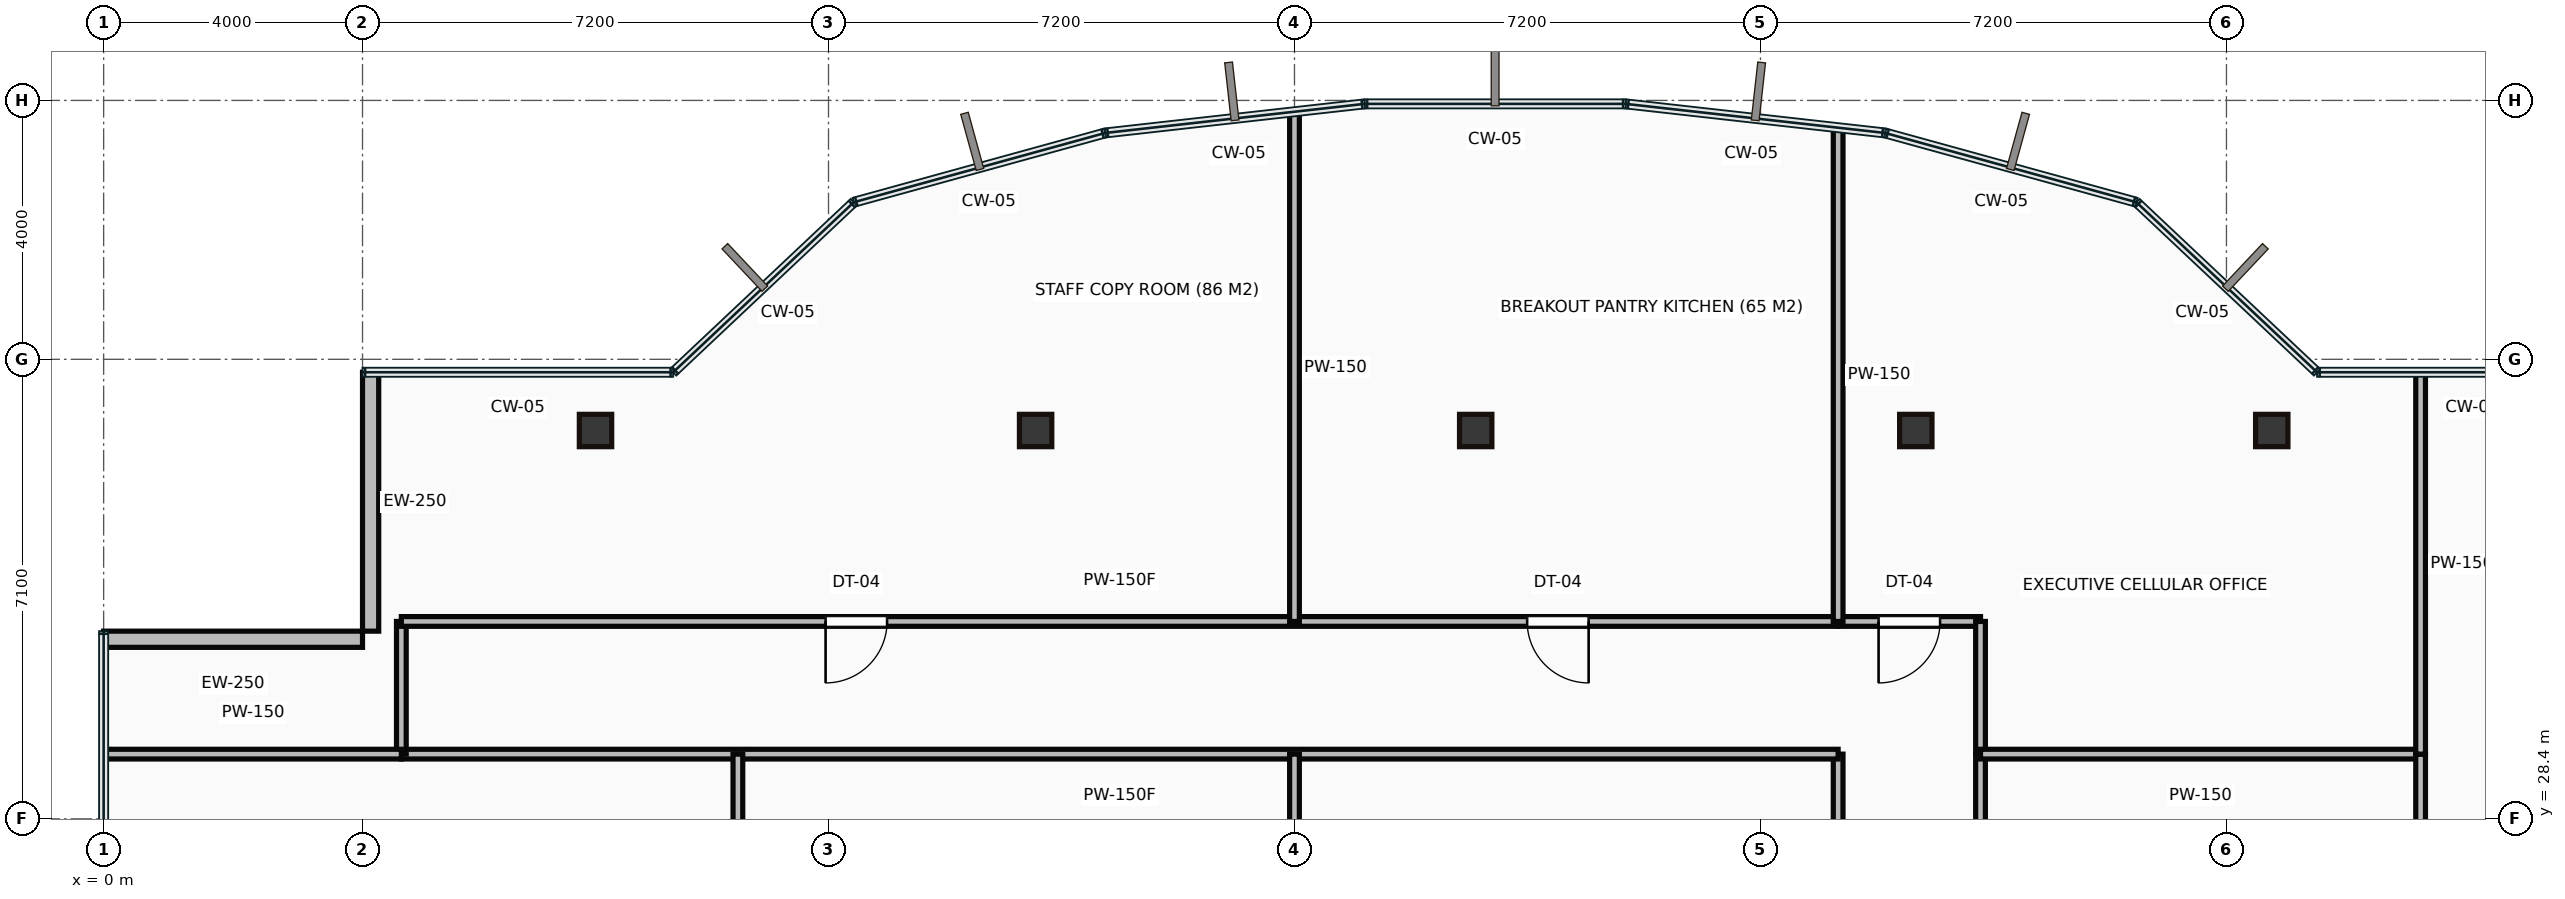
"""IFC4 building model, lengths in metres.
Left out: names, types, materials, properties, quantities, classifications, styles, units other than length and angle.
Written with IfcOpenShell. Run it as: python <this file> out.ifc"""

import sys

from ifc_helpers import new_model, si_unit, direction, frame, frame_2d, origin, origin_2d, place, context, subcontext, project, spatial, rectangle, hollow_rectangle, extrude, source, transform, mapped, element, fill, save


model = new_model("IFC4")
c1 = context("Model", 3, precision=1e-05, world=origin(), true_north=direction((0.0, 1.0)))
c2 = subcontext(c1, "Body", "Model", "MODEL_VIEW")
j1 = project(units=[si_unit("LENGTHUNIT", "METRE"), si_unit("PLANEANGLEUNIT", "RADIAN")], contexts=[c1])
p1 = place(None, origin())
s1 = spatial("IfcSite", under=j1, at=p1, CompositionType="ELEMENT")
p2 = place(p1, origin())
s2 = spatial("IfcBuilding", under=s1, at=p2, CompositionType="ELEMENT")
p3 = place(p2, frame((0.0, 0.0, 225.1)))
s3 = spatial("IfcBuildingStorey", under=s2, at=p3, CompositionType="ELEMENT", Elevation=225.1)
m1 = source(origin(), c2, "Body", "SweptSolid", [
    extrude(hollow_rectangle(XDim=0.5, YDim=0.5, WallThickness=0.022, at=origin_2d()), origin(), (0.0, 0.0, 1.0), 3.65),
])
for number, where, z_axis, x_axis in (
    (1, (7.6, 34.4, 0.0), (0.0, 0.0, 1.0), (1.0, 0.0, 0.0)),
    (2, (14.4, 34.4, 0.0), (0.0, 0.0, 1.0), (1.0, 0.0, 0.0)),
    (3, (21.2, 34.4, 0.0), (0.0, 0.0, 1.0), (1.0, 0.0, 0.0)),
    (4, (28.0, 34.4, 0.0), (0.0, 0.0, 1.0), (1.0, 0.0, 0.0)),
    (5, (33.5, 34.4, 0.0), (0.0, 0.0, 1.0), (1.0, 0.0, 0.0)),
):
    element("IfcColumn", number, at=place(p3, frame(where, z_axis=z_axis, x_axis=x_axis)), inside=s3, PredefinedType="COLUMN", context=c2, shape_type="MappedRepresentation", body=[
        mapped(m1, transform((0.0, 0.0, 0.0))),
    ])
m2 = source(origin(), c2, "Body", "SweptSolid", [
    extrude(rectangle(XDim=4.0, YDim=0.25, at=frame_2d((2.0, 0.0))), origin(), (0.0, 0.0, 1.0), 3.4),
])
for number, where, z_axis, x_axis in (
    (6, (4.125, 35.3, 0.0), (0.0, 0.0, 1.0), (0.0, -1.0, 0.0)),
    (7, (4.0, 31.175, 0.0), (0.0, 0.0, 1.0), (-1.0, 0.0, 0.0)),
):
    element("IfcWall", number, at=place(p3, frame(where, z_axis=z_axis, x_axis=x_axis)), inside=s3, PredefinedType="STANDARD", context=c2, shape_type="MappedRepresentation", body=[
        mapped(m2, transform((0.0, 0.0, 0.0))),
    ])
m3 = source(origin(), c2, "Body", "SweptSolid", [
    extrude(rectangle(XDim=13.2, YDim=0.15, at=frame_2d((6.6, 0.0))), origin(), (0.0, 0.0, 1.0), 3.4),
])
p4 = place(p3, frame((26.8, 16.2, 0.0), z_axis=(0.0, 0.0, 1.0), x_axis=(0.0, 1.0, 0.0)))
e8 = element("IfcWall", 8, at=p4, inside=s3, PredefinedType="PARTITIONING", context=c2, shape_type="MappedRepresentation", body=[
    mapped(m3, transform((0.0, 0.0, 0.0))),
])
p5 = place(p4, frame((6.125, 0.0, 0.0)))
e9 = element("IfcOpeningElement", 9, at=p5, cuts=e8, PredefinedType="OPENING", context=c2, shape_type="SweptSolid", body=[
    extrude(rectangle(XDim=0.95, YDim=2.15, at=frame_2d((0.475, 1.075))), frame((0.0, 0.085, 0.0), z_axis=(0.0, -1.0, 0.0), x_axis=(1.0, 0.0, 0.0)), (0.0, 0.0, 1.0), 0.17),
])
m4 = source(origin(), c2, "Body", "SweptSolid", [
    extrude(rectangle(XDim=22.2, YDim=0.15, at=frame_2d((11.1, 0.0))), origin(), (0.0, 0.0, 1.0), 3.4),
])
p6 = place(p3, frame((26.8, 29.4, 0.0), z_axis=(0.0, 0.0, 1.0), x_axis=(-1.0, 0.0, 0.0)))
e10 = element("IfcWall", 10, at=p6, inside=s3, PredefinedType="PARTITIONING", context=c2, shape_type="MappedRepresentation", body=[
    mapped(m4, transform((0.0, 0.0, 0.0))),
])
m5 = source(origin(), c2, "Body", "SweptSolid", [
    extrude(rectangle(XDim=2.05, YDim=0.15, at=frame_2d((1.025, 0.0))), origin(), (0.0, 0.0, 1.0), 3.4),
])
p7 = place(p3, frame((4.6, 29.4, 0.0), z_axis=(0.0, 0.0, 1.0), x_axis=(0.0, 1.0, 0.0)))
e11 = element("IfcWall", 11, at=p7, inside=s3, PredefinedType="PARTITIONING", context=c2, shape_type="MappedRepresentation", body=[
    mapped(m5, transform((0.0, 0.0, 0.0))),
])
p8 = place(p3, frame((4.6, 31.45, 0.0), z_axis=(0.0, 0.0, 1.0), x_axis=(1.0, 0.0, 0.0)))
e12 = element("IfcWall", 12, at=p8, inside=s3, PredefinedType="PARTITIONING", context=c2, shape_type="MappedRepresentation", body=[
    mapped(m4, transform((0.0, 0.0, 0.0))),
])
p9 = place(p8, frame((6.555, 0.0, 0.0)))
e13 = element("IfcOpeningElement", 13, at=p9, cuts=e12, PredefinedType="OPENING", context=c2, shape_type="SweptSolid", body=[
    extrude(rectangle(XDim=0.95, YDim=2.15, at=frame_2d((0.475, 1.075))), frame((0.0, 0.085, 0.0), z_axis=(0.0, -1.0, 0.0), x_axis=(1.0, 0.0, 0.0)), (0.0, 0.0, 1.0), 0.17),
])
p10 = place(p8, frame((17.395, 0.0, 0.0)))
e14 = element("IfcOpeningElement", 14, at=p10, cuts=e12, PredefinedType="OPENING", context=c2, shape_type="SweptSolid", body=[
    extrude(rectangle(XDim=0.95, YDim=2.15, at=frame_2d((0.475, 1.075))), frame((0.0, 0.085, 0.0), z_axis=(0.0, -1.0, 0.0), x_axis=(1.0, 0.0, 0.0)), (0.0, 0.0, 1.0), 0.17),
])
m6 = source(origin(), c2, "Body", "SweptSolid", [
    extrude(rectangle(XDim=2.2, YDim=0.15, at=frame_2d((1.1, 0.0))), origin(), (0.0, 0.0, 1.0), 3.4),
])
p11 = place(p3, frame((26.8, 31.45, 0.0), z_axis=(0.0, 0.0, 1.0), x_axis=(1.0, 0.0, 0.0)))
e15 = element("IfcWall", 15, at=p11, inside=s3, PredefinedType="PARTITIONING", context=c2, shape_type="MappedRepresentation", body=[
    mapped(m6, transform((0.0, 0.0, 0.0))),
])
p12 = place(p11, frame((0.625, 0.0, 0.0)))
e16 = element("IfcOpeningElement", 16, at=p12, cuts=e15, PredefinedType="OPENING", context=c2, shape_type="SweptSolid", body=[
    extrude(rectangle(XDim=0.95, YDim=2.15, at=frame_2d((0.475, 1.075))), frame((0.0, 0.085, 0.0), z_axis=(0.0, -1.0, 0.0), x_axis=(1.0, 0.0, 0.0)), (0.0, 0.0, 1.0), 0.17),
])
p13 = place(p3, frame((29.0, 31.45, 0.0), z_axis=(0.0, 0.0, 1.0), x_axis=(0.0, -1.0, 0.0)))
e17 = element("IfcWall", 17, at=p13, inside=s3, PredefinedType="PARTITIONING", context=c2, shape_type="MappedRepresentation", body=[
    mapped(m5, transform((0.0, 0.0, 0.0))),
])
p14 = place(p3, frame((29.0, 29.4, 0.0), z_axis=(0.0, 0.0, 1.0), x_axis=(0.0, -1.0, 0.0)))
e18 = element("IfcWall", 18, at=p14, inside=s3, PredefinedType="PARTITIONING", context=c2, shape_type="MappedRepresentation", body=[
    mapped(m3, transform((0.0, 0.0, 0.0))),
])
p15 = place(p14, frame((6.125, 0.0, 0.0)))
e19 = element("IfcOpeningElement", 19, at=p15, cuts=e18, PredefinedType="OPENING", context=c2, shape_type="SweptSolid", body=[
    extrude(rectangle(XDim=0.95, YDim=2.15, at=frame_2d((0.475, 1.075))), frame((0.0, 0.085, 0.0), z_axis=(0.0, -1.0, 0.0), x_axis=(1.0, 0.0, 0.0)), (0.0, 0.0, 1.0), 0.17),
])
m7 = source(origin(), c2, "Body", "SweptSolid", [
    extrude(rectangle(XDim=4.58, YDim=0.15, at=frame_2d((2.29, 0.0))), origin(), (0.0, 0.0, 1.0), 3.4),
])
p16 = place(p3, frame((0.02, 29.4, 0.0), z_axis=(0.0, 0.0, 1.0), x_axis=(1.0, 0.0, 0.0)))
e20 = element("IfcWall", 20, at=p16, inside=s3, PredefinedType="PARTITIONING", context=c2, shape_type="MappedRepresentation", body=[
    mapped(m7, transform((0.0, 0.0, 0.0))),
])
for number, where, z_axis, x_axis in (
    (21, (9.8, 29.4, 0.0), (0.0, 0.0, 1.0), (0.0, -1.0, 0.0)),
    (22, (18.4, 29.4, 0.0), (0.0, 0.0, 1.0), (0.0, -1.0, 0.0)),
):
    element("IfcWall", number, at=place(p3, frame(where, z_axis=z_axis, x_axis=x_axis)), inside=s3, PredefinedType="PARTITIONING", context=c2, shape_type="MappedRepresentation", body=[
        mapped(m3, transform((0.0, 0.0, 0.0))),
    ])
m8 = source(origin(), c2, "Body", "SweptSolid", [
    extrude(rectangle(XDim=7.855, YDim=0.15, at=frame_2d((3.928, 0.0))), origin(), (0.0, 0.0, 1.0), 3.4),
])
p17 = place(p3, frame((18.4, 39.305, 0.0), z_axis=(0.0, 0.0, 1.0), x_axis=(0.0, -1.0, 0.0)))
e23 = element("IfcWall", 23, at=p17, inside=s3, PredefinedType="PARTITIONING", context=c2, shape_type="MappedRepresentation", body=[
    mapped(m8, transform((0.0, 0.0, 0.0))),
])
m9 = source(origin(), c2, "Body", "SweptSolid", [
    extrude(rectangle(XDim=7.608, YDim=0.15, at=frame_2d((3.804, 0.0))), origin(), (0.0, 0.0, 1.0), 3.4),
])
p18 = place(p3, frame((26.8, 39.058, 0.0), z_axis=(0.0, 0.0, 1.0), x_axis=(0.0, -1.0, 0.0)))
e24 = element("IfcWall", 24, at=p18, inside=s3, PredefinedType="PARTITIONING", context=c2, shape_type="MappedRepresentation", body=[
    mapped(m9, transform((0.0, 0.0, 0.0))),
])
m10 = source(origin(), c2, "Body", "SweptSolid", [
    extrude(rectangle(XDim=6.8, YDim=0.15, at=frame_2d((3.4, 0.0))), origin(), (0.0, 0.0, 1.0), 3.4),
])
p19 = place(p3, frame((35.8, 29.4, 0.0), z_axis=(0.0, 0.0, 1.0), x_axis=(-1.0, 0.0, 0.0)))
e25 = element("IfcWall", 25, at=p19, inside=s3, PredefinedType="PARTITIONING", context=c2, shape_type="MappedRepresentation", body=[
    mapped(m10, transform((0.0, 0.0, 0.0))),
])
p20 = place(p3, frame((35.8, 29.4, 0.0), z_axis=(0.0, 0.0, 1.0), x_axis=(0.0, -1.0, 0.0)))
e26 = element("IfcWall", 26, at=p20, inside=s3, PredefinedType="PARTITIONING", context=c2, shape_type="MappedRepresentation", body=[
    mapped(m3, transform((0.0, 0.0, 0.0))),
])
m11 = source(origin(), c2, "Body", "SweptSolid", [
    extrude(rectangle(XDim=5.88, YDim=0.15, at=frame_2d((2.94, 0.0))), origin(), (0.0, 0.0, 1.0), 3.4),
])
p21 = place(p3, frame((35.8, 35.28, 0.0), z_axis=(0.0, 0.0, 1.0), x_axis=(0.0, -1.0, 0.0)))
e27 = element("IfcWall", 27, at=p21, inside=s3, PredefinedType="PARTITIONING", context=c2, shape_type="MappedRepresentation", body=[
    mapped(m11, transform((0.0, 0.0, 0.0))),
])
m12 = source(origin(), c2, "Body", "SweptSolid", [
    extrude(rectangle(XDim=0.95, YDim=2.15, at=frame_2d((0.475, 1.075))), frame((0.0, 0.025, 0.0), z_axis=(0.0, -1.0, 0.0), x_axis=(1.0, 0.0, 0.0)), (0.0, 0.0, 1.0), 0.05),
])
p22 = place(p9, origin())
e28 = element("IfcDoor", 28, at=p22, inside=s3, OperationType="SINGLE_SWING_LEFT", PredefinedType="DOOR", context=c2, shape_type="MappedRepresentation", body=[
    mapped(m12, transform((0.0, 0.0, 0.0))),
])
fill(e13, e28)
p23 = place(p10, origin())
e29 = element("IfcDoor", 29, at=p23, inside=s3, OperationType="SINGLE_SWING_RIGHT", PredefinedType="DOOR", context=c2, shape_type="MappedRepresentation", body=[
    mapped(m12, transform((0.0, 0.0, 0.0))),
])
fill(e14, e29)
p24 = place(p12, origin())
e30 = element("IfcDoor", 30, at=p24, inside=s3, OperationType="SINGLE_SWING_LEFT", PredefinedType="DOOR", context=c2, shape_type="MappedRepresentation", body=[
    mapped(m12, transform((0.0, 0.0, 0.0))),
])
fill(e16, e30)
save(model, sys.argv[1])
